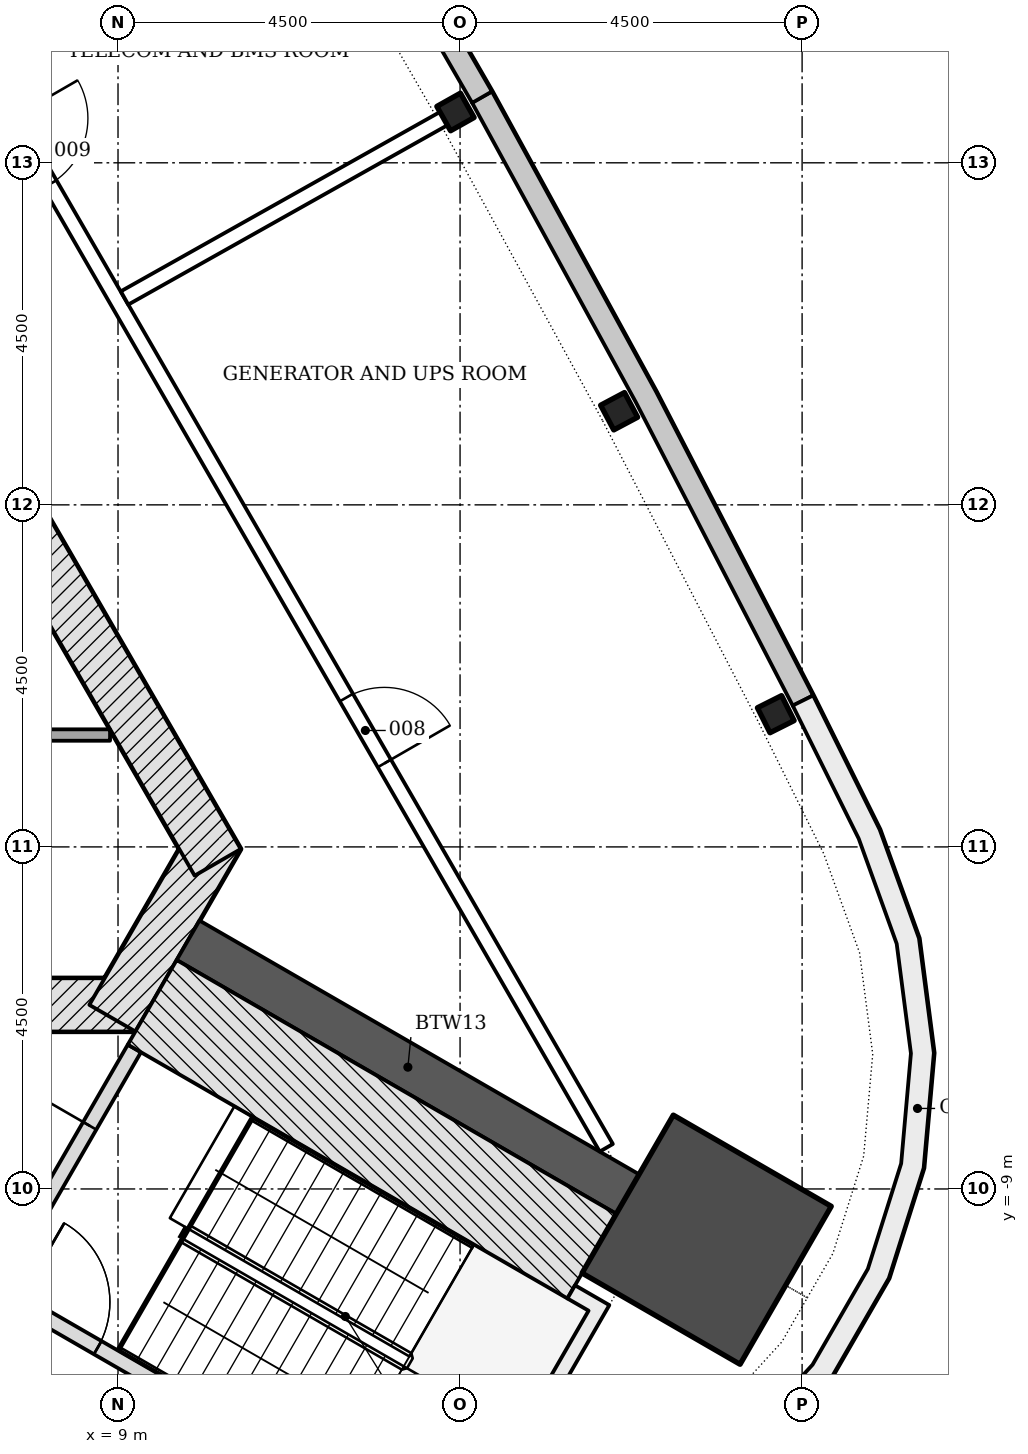
"""IFC4 building model, lengths in metres.
Left out: names, types, materials, properties, quantities, classifications, styles, units other than length and angle.
Written with IfcOpenShell. Run it as: python <this file> out.ifc"""

import sys

from ifc_helpers import new_model, si_unit, direction, frame, frame_2d, origin, origin_2d, place, context, subcontext, project, spatial, polyline, rectangle, i_section, outline, extrude, element, fill, save


model = new_model("IFC4")
c1 = context("Model", 3, precision=1e-05, world=origin(), true_north=direction((0.0, 1.0)))
c2 = subcontext(c1, "Body", "Model", "MODEL_VIEW")
j1 = project(units=[si_unit("LENGTHUNIT", "METRE"), si_unit("PLANEANGLEUNIT", "RADIAN")], contexts=[c1])
p1 = place(None, origin())
s1 = spatial("IfcSite", under=j1, at=p1, CompositionType="ELEMENT")
p2 = place(p1, origin())
s2 = spatial("IfcBuilding", under=s1, at=p2, CompositionType="ELEMENT")
p3 = place(p2, frame((0.0, 0.0, 302.1)))
s3 = spatial("IfcBuildingStorey", under=s2, at=p3, CompositionType="ELEMENT", Elevation=302.1)
p4 = place(p3, frame((-9.229, -6.578, -0.25), z_axis=(0.0, 0.0, 1.0), x_axis=(1.0, 0.0, 0.0)))
e1 = element("IfcWall", 1, at=p4, inside=s3, PredefinedType="SHEAR", context=c2, shape_type="SweptSolid", body=[
    extrude(rectangle(XDim=18.458, YDim=0.7, at=frame_2d((9.229, 0.0))), origin(), (0.0, 0.0, 1.0), 4.5),
])
p5 = place(p4, frame((8.7, 0.0, 0.25)))
e2 = element("IfcOpeningElement", 2, at=p5, cuts=e1, PredefinedType="OPENING", context=c2, shape_type="SweptSolid", body=[
    extrude(rectangle(XDim=1.0, YDim=2.1, at=frame_2d((0.5, 1.05))), frame((0.0, 0.36, 0.0), z_axis=(0.0, -1.0, 0.0), x_axis=(1.0, 0.0, 0.0)), (0.0, 0.0, 1.0), 0.72),
])
p6 = place(p4, frame((3.99, 0.0, 0.25)))
e3 = element("IfcOpeningElement", 3, at=p6, cuts=e1, PredefinedType="OPENING", context=c2, shape_type="SweptSolid", body=[
    extrude(rectangle(XDim=0.9, YDim=2.1, at=frame_2d((0.45, 1.05))), frame((0.0, 0.36, 0.0), z_axis=(0.0, -1.0, 0.0), x_axis=(1.0, 0.0, 0.0)), (0.0, 0.0, 1.0), 0.72),
])
p7 = place(p4, frame((13.539, 0.0, 0.25)))
e4 = element("IfcOpeningElement", 4, at=p7, cuts=e1, PredefinedType="OPENING", context=c2, shape_type="SweptSolid", body=[
    extrude(rectangle(XDim=0.9, YDim=2.1, at=frame_2d((0.45, 1.05))), frame((0.0, 0.36, 0.0), z_axis=(0.0, -1.0, 0.0), x_axis=(1.0, 0.0, 0.0)), (0.0, 0.0, 1.0), 0.72),
])
p8 = place(p3, frame((8.926, -6.753, -0.25), z_axis=(0.0, 0.0, 1.0), x_axis=(0.500042739161, 0.866000726912, 0.0)))
e5 = element("IfcWall", 5, at=p8, inside=s3, PredefinedType="SHEAR", context=c2, shape_type="SweptSolid", body=[
    extrude(rectangle(XDim=2.771, YDim=0.7, at=frame_2d((1.386, 0.0))), origin(), (0.0, 0.0, 1.0), 4.5),
])
p9 = place(p3, frame((10.311, -4.703, -0.25), z_axis=(0.0, 0.0, 1.0), x_axis=(-0.500001446645, 0.866024568562, 0.0)))
e6 = element("IfcWall", 6, at=p9, inside=s3, PredefinedType="SHEAR", context=c2, shape_type="SweptSolid", body=[
    extrude(rectangle(XDim=18.458, YDim=0.7, at=frame_2d((9.229, 0.0))), origin(), (0.0, 0.0, 1.0), 4.5),
])
p10 = place(p3, frame((9.922, -5.728, -0.25), z_axis=(0.0, 0.0, 1.0), x_axis=(0.866032176823, -0.499988268569, 0.0)))
e7 = element("IfcWall", 7, at=p10, inside=s3, PredefinedType="SHEAR", context=c2, shape_type="SweptSolid", body=[
    extrude(rectangle(XDim=6.678, YDim=0.6, at=frame_2d((3.339, 0.0))), origin(), (0.0, 0.0, 1.0), 4.5),
])
p11 = place(p3, frame((16.745, -9.667, -0.25), z_axis=(0.0, 0.0, 1.0), x_axis=(0.866025403784, -0.5, 0.0)))
e8 = element("IfcColumn", 8, at=p11, inside=s3, PredefinedType="COLUMN", context=c2, shape_type="SweptSolid", body=[
    extrude(rectangle(XDim=2.4, YDim=2.4, at=origin_2d()), origin(), (0.0, 0.0, 1.0), 4.5),
])
for number, where, z_axis, x_axis in (
    (9, (17.654, -2.754, -0.25), (0.0, 0.0, 1.0), (-0.449, 0.894, 0.0)),
    (10, (15.593, 1.232, -0.25), (0.0, 0.0, 1.0), (-0.47, 0.883, 0.0)),
    (11, (13.44, 5.169, -0.25), (0.0, 0.0, 1.0), (-0.49, 0.872, 0.0)),
):
    element("IfcColumn", number, at=place(p3, frame(where, z_axis=z_axis, x_axis=x_axis)), inside=s3, PredefinedType="COLUMN", context=c2, shape_type="SweptSolid", body=[
        extrude(i_section(OverallWidth=0.368, OverallDepth=0.356, WebThickness=0.011, FlangeThickness=0.018, FilletRadius=0.015, at=origin_2d()), origin(), (0.0, 0.0, 1.0), 4.5),
    ])
p12 = place(p3, origin())
e12 = element("IfcWall", 12, at=p12, inside=s3, PredefinedType="NOTDEFINED", context=c2, shape_type="SweptSolid", body=[
    extrude(outline(polyline([(18.145, -2.507), (16.078, 1.49), (13.919, 5.438), (13.656, 5.294), (15.813, 1.349), (17.878, -2.645), (18.145, -2.507)])), origin(), (0.0, 0.0, 1.0), 4.25),
])
p13 = place(p3, origin())
e13 = element("IfcWall", 13, at=p13, inside=s3, PredefinedType="NOTDEFINED", context=c2, shape_type="SweptSolid", body=[
    extrude(outline(polyline([(13.919, 5.438), (11.669, 9.335), (11.409, 9.185), (13.659, 5.288), (13.919, 5.438)])), origin(), (0.0, 0.0, 1.0), 1.2),
])
p14 = place(p3, origin())
e14 = element("IfcWall", 14, at=p14, inside=s3, PredefinedType="NOTDEFINED", context=c2, shape_type="SweptSolid", body=[
    extrude(outline(polyline([(11.244, -14.46), (13.211, -14.336), (14.708, -14.069), (16.111, -13.485), (17.355, -12.611), (18.381, -11.49), (19.141, -10.174), (19.599, -8.724), (19.733, -7.21), (19.538, -5.703), (19.021, -4.273), (18.145, -2.507), (17.876, -2.64), (18.745, -4.391), (19.244, -5.774), (19.432, -7.216), (19.303, -8.665), (18.865, -10.052), (18.138, -11.312), (17.156, -12.385), (15.965, -13.22), (14.623, -13.779), (13.176, -14.038), (11.225, -14.161), (11.244, -14.46)])), origin(), (0.0, 0.0, 1.0), 4.25),
])
p15 = place(p3, frame((1.071, -3.028, 0.0), z_axis=(0.0, 0.0, 1.0), x_axis=(1.0, 0.0, 0.0)))
e15 = element("IfcWall", 15, at=p15, inside=s3, PredefinedType="PARTITIONING", context=c2, shape_type="SweptSolid", body=[
    extrude(rectangle(XDim=7.824, YDim=0.15, at=frame_2d((3.912, 0.0))), origin(), (0.0, 0.0, 1.0), 4.25),
])
p16 = place(p3, frame((7.44, -10.226, -0.25), z_axis=(0.0, 0.0, 1.0), x_axis=(0.500022077904, 0.866012656725, 0.0)))
e16 = element("IfcWall", 16, at=p16, inside=s3, PredefinedType="SHEAR", context=c2, shape_type="SweptSolid", body=[
    extrude(rectangle(XDim=3.55, YDim=0.2, at=frame_2d((1.775, 0.0))), origin(), (0.0, 0.0, 1.0), 4.5),
])
p17 = place(p16, frame((1.175, 0.0, 0.25)))
e17 = element("IfcOpeningElement", 17, at=p17, cuts=e16, PredefinedType="OPENING", context=c2, shape_type="SweptSolid", body=[
    extrude(rectangle(XDim=1.2, YDim=2.1, at=frame_2d((0.6, 1.05))), frame((0.0, 0.11, 0.0), z_axis=(0.0, -1.0, 0.0), x_axis=(1.0, 0.0, 0.0)), (0.0, 0.0, 1.0), 0.22),
])
p18 = place(p3, frame((7.304, -10.262, -0.25), z_axis=(0.0, 0.0, 1.0), x_axis=(0.866026594901, -0.49999793692, 0.0)))
e18 = element("IfcWall", 18, at=p18, inside=s3, PredefinedType="SHEAR", context=c2, shape_type="SweptSolid", body=[
    extrude(rectangle(XDim=5.6, YDim=0.2, at=frame_2d((2.8, 0.0))), origin(), (0.0, 0.0, 1.0), 4.5),
])
p19 = place(p18, frame((0.45, 0.0, 0.25)))
e19 = element("IfcOpeningElement", 19, at=p19, cuts=e18, PredefinedType="OPENING", context=c2, shape_type="SweptSolid", body=[
    extrude(rectangle(XDim=1.2, YDim=2.1, at=frame_2d((0.6, 1.05))), frame((0.0, 0.11, 0.0), z_axis=(0.0, -1.0, 0.0), x_axis=(1.0, 0.0, 0.0)), (0.0, 0.0, 1.0), 0.22),
])
p20 = place(p3, frame((9.45, -6.545, -0.25), z_axis=(0.0, 0.0, 1.0), x_axis=(0.866016347338, -0.500015685897, 0.0)))
e20 = element("IfcWall", 20, at=p20, inside=s3, PredefinedType="SHEAR", context=c2, shape_type="SweptSolid", body=[
    extrude(rectangle(XDim=6.678, YDim=1.286, at=frame_2d((3.339, 0.0))), origin(), (0.0, 0.0, 1.0), 4.5),
])
p21 = place(p3, frame((0.0, 0.0, -0.25)))
e21 = element("IfcWall", 21, at=p21, inside=s3, PredefinedType="SHEAR", context=c2, shape_type="SweptSolid", body=[
    extrude(outline(polyline([(12.104, -13.149), (14.289, -12.563), (15.464, -10.528), (15.013, -10.268), (14.913, -10.441), (15.191, -10.601), (14.157, -12.392), (12.132, -12.934), (12.204, -12.976), (12.204, -12.976), (12.204, -12.976), (12.204, -12.976), (12.204, -12.976), (12.204, -12.976), (12.204, -12.976), (12.204, -12.976), (12.204, -12.976), (12.204, -12.976), (12.204, -12.976), (12.204, -12.976), (12.204, -12.976), (12.204, -12.976), (12.204, -12.976), (12.204, -12.976), (12.204, -12.976), (12.104, -13.149)])), origin(), (0.0, 0.0, 1.0), 4.5),
])
p22 = place(p3, frame((5.455, 8.808, 0.0), z_axis=(0.0, 0.0, 1.0), x_axis=(0.499996641012, -0.866027343088, 0.0)))
e22 = element("IfcWall", 22, at=p22, inside=s3, PredefinedType="PARTITIONING", context=c2, shape_type="SweptSolid", body=[
    extrude(rectangle(XDim=19.937, YDim=0.2, at=frame_2d((9.969, 0.0))), origin(), (0.0, 0.0, 1.0), 3.702),
])
p23 = place(p22, frame((13.097, 0.0, 0.0)))
e23 = element("IfcOpeningElement", 23, at=p23, cuts=e22, PredefinedType="OPENING", context=c2, shape_type="SweptSolid", body=[
    extrude(rectangle(XDim=1.0, YDim=2.1, at=frame_2d((0.5, 1.05))), frame((0.0, 0.11, 0.0), z_axis=(0.0, -1.0, 0.0), x_axis=(1.0, 0.0, 0.0)), (0.0, 0.0, 1.0), 0.22),
])
p24 = place(p22, frame((4.297, 0.0, 0.0)))
e24 = element("IfcOpeningElement", 24, at=p24, cuts=e22, PredefinedType="OPENING", context=c2, shape_type="SweptSolid", body=[
    extrude(rectangle(XDim=1.0, YDim=2.1, at=frame_2d((0.5, 1.05))), frame((0.0, 0.11, 0.0), z_axis=(0.0, -1.0, 0.0), x_axis=(1.0, 0.0, 0.0)), (0.0, 0.0, 1.0), 0.22),
])
p25 = place(p22, frame((0.963, 0.0, 0.0)))
e25 = element("IfcOpeningElement", 25, at=p25, cuts=e22, PredefinedType="OPENING", context=c2, shape_type="SweptSolid", body=[
    extrude(rectangle(XDim=1.0, YDim=2.1, at=frame_2d((0.5, 1.05))), frame((0.0, 0.11, 0.0), z_axis=(0.0, -1.0, 0.0), x_axis=(1.0, 0.0, 0.0)), (0.0, 0.0, 1.0), 0.22),
])
p26 = place(p3, frame((9.086, 2.722, 0.0), z_axis=(0.0, 0.0, 1.0), x_axis=(0.87175044705, 0.489950158759, 0.0)))
e26 = element("IfcWall", 26, at=p26, inside=s3, PredefinedType="PARTITIONING", context=c2, shape_type="SweptSolid", body=[
    extrude(rectangle(XDim=4.844, YDim=0.2, at=frame_2d((2.422, 0.0))), origin(), (0.0, 0.0, 1.0), 3.702),
])
p27 = place(p17, origin())
e27 = element("IfcDoor", 27, at=p27, inside=s3, OperationType="SINGLE_SWING_RIGHT", PredefinedType="DOOR", context=c2, shape_type="SweptSolid", body=[
    extrude(rectangle(XDim=1.2, YDim=2.1, at=frame_2d((0.6, 1.05))), frame((0.0, 0.025, 0.0), z_axis=(0.0, -1.0, 0.0), x_axis=(1.0, 0.0, 0.0)), (0.0, 0.0, 1.0), 0.05),
])
fill(e17, e27)
p28 = place(p19, origin())
e28 = element("IfcDoor", 28, at=p28, inside=s3, OperationType="SINGLE_SWING_LEFT", PredefinedType="DOOR", context=c2, shape_type="SweptSolid", body=[
    extrude(rectangle(XDim=1.2, YDim=2.1, at=frame_2d((0.6, 1.05))), frame((0.0, 0.025, 0.0), z_axis=(0.0, -1.0, 0.0), x_axis=(1.0, 0.0, 0.0)), (0.0, 0.0, 1.0), 0.05),
])
fill(e19, e28)
p29 = place(p2, frame((0.0, 0.0, 306.6)))
p30 = place(p29, frame((7.304, -10.262, -0.25), z_axis=(0.0, 0.0, 1.0), x_axis=(0.866026594901, -0.49999793692, 0.0)))
p31 = place(p30, frame((0.45, 0.0, 0.25)))
p32 = place(p31, origin())
e29 = element("IfcDoor", 29, at=p32, inside=s3, OperationType="SINGLE_SWING_LEFT", PredefinedType="DOOR", context=c2, shape_type="SweptSolid", body=[
    extrude(rectangle(XDim=1.2, YDim=2.1, at=frame_2d((0.6, 1.05))), frame((0.0, 0.025, 0.0), z_axis=(0.0, -1.0, 0.0), x_axis=(1.0, 0.0, 0.0)), (0.0, 0.0, 1.0), 0.05),
])
p33 = place(p23, origin())
e30 = element("IfcDoor", 30, at=p33, inside=s3, OperationType="SINGLE_SWING_RIGHT", PredefinedType="DOOR", context=c2, shape_type="SweptSolid", body=[
    extrude(rectangle(XDim=1.0, YDim=2.1, at=frame_2d((0.5, 1.05))), frame((0.0, 0.025, 0.0), z_axis=(0.0, -1.0, 0.0), x_axis=(1.0, 0.0, 0.0)), (0.0, 0.0, 1.0), 0.05),
])
fill(e23, e30)
save(model, sys.argv[1])
